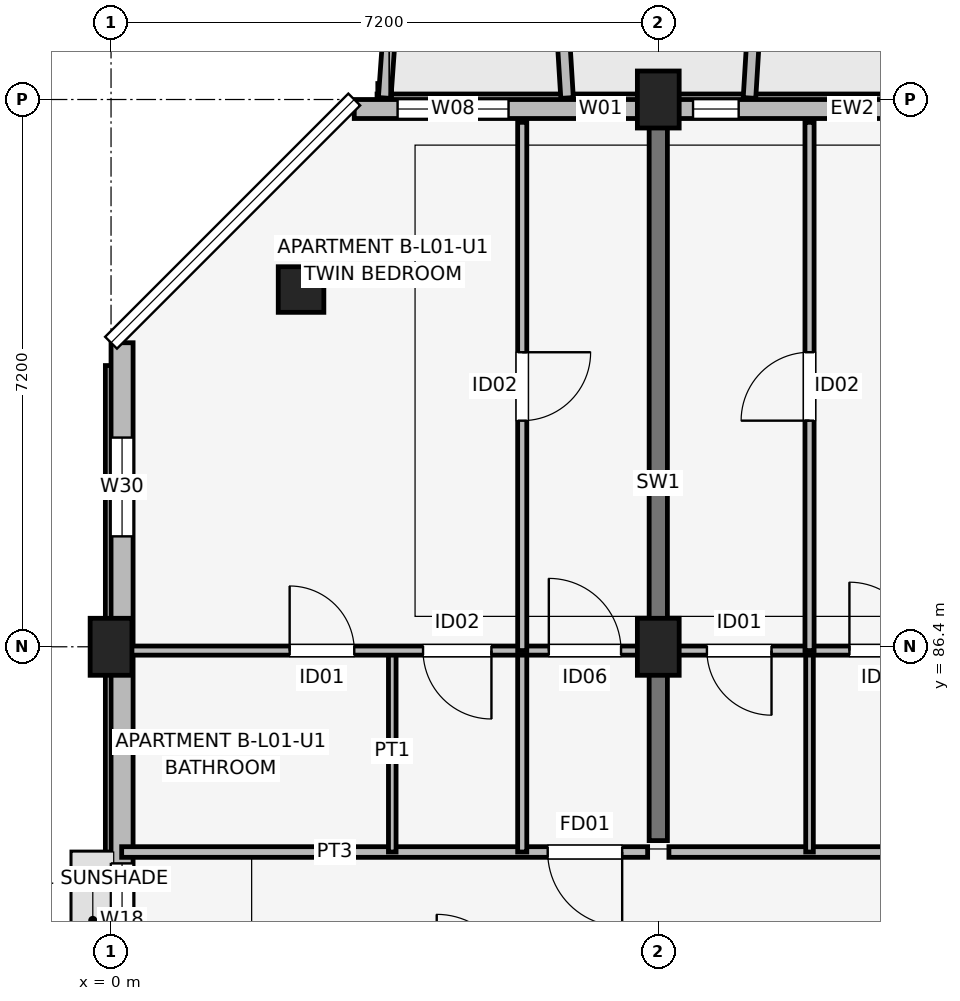
"""IFC4 building model, lengths in metres.
Left out: names, types, materials, properties, quantities, classifications, styles, units other than length and angle.
Written with IfcOpenShell. Run it as: python <this file> out.ifc"""

import sys

from ifc_helpers import new_model, si_unit, direction, frame, frame_2d, origin, origin_2d, place, context, subcontext, project, spatial, rectangle, extrude, element, fill, save


model = new_model("IFC4")
c1 = context("Model", 3, precision=1e-05, world=origin(), true_north=direction((0.0, 1.0)))
c2 = subcontext(c1, "Body", "Model", "MODEL_VIEW")
j1 = project(units=[si_unit("LENGTHUNIT", "METRE"), si_unit("PLANEANGLEUNIT", "RADIAN")], contexts=[c1])
p1 = place(None, origin())
s1 = spatial("IfcSite", under=j1, at=p1, CompositionType="ELEMENT")
p2 = place(p1, origin())
s2 = spatial("IfcBuilding", under=s1, at=p2, CompositionType="ELEMENT")
p3 = place(p2, frame((0.0, 0.0, 4.5)))
s3 = spatial("IfcBuildingStorey", under=s2, at=p3, CompositionType="ELEMENT", Elevation=4.5)
p4 = place(p3, frame((0.0, 86.4, 0.0), z_axis=(0.0, 0.0, 1.0), x_axis=(1.0, 0.0, 0.0)))
e1 = element("IfcColumn", 1, at=p4, inside=s3, PredefinedType="COLUMN", context=c2, shape_type="SweptSolid", body=[
    extrude(rectangle(XDim=0.55, YDim=0.75, at=origin_2d()), origin(), (0.0, 0.0, 1.0), 4.2),
])
p5 = place(p3, frame((2.5, 91.1, 0.0), z_axis=(0.0, 0.0, 1.0), x_axis=(1.0, 0.0, 0.0)))
e2 = element("IfcColumn", 2, at=p5, inside=s3, PredefinedType="COLUMN", context=c2, shape_type="SweptSolid", body=[
    extrude(rectangle(XDim=0.6, YDim=0.6, at=origin_2d()), origin(), (0.0, 0.0, 1.0), 4.2),
])
for number, where, z_axis, x_axis in (
    (3, (7.2, 86.4, 0.0), (0.0, 0.0, 1.0), (1.0, 0.0, 0.0)),
    (4, (7.2, 93.6, 0.0), (0.0, 0.0, 1.0), (1.0, 0.0, 0.0)),
):
    element("IfcColumn", number, at=place(p3, frame(where, z_axis=z_axis, x_axis=x_axis)), inside=s3, PredefinedType="COLUMN", context=c2, shape_type="SweptSolid", body=[
        extrude(rectangle(XDim=0.55, YDim=0.75, at=origin_2d()), origin(), (0.0, 0.0, 1.0), 4.2),
    ])
p6 = place(p3, frame((7.2, 83.85, 0.0), z_axis=(0.0, 0.0, 1.0), x_axis=(0.0, 1.0, 0.0)))
e5 = element("IfcWall", 5, at=p6, inside=s3, PredefinedType="SHEAR", context=c2, shape_type="SweptSolid", body=[
    extrude(rectangle(XDim=9.4, YDim=0.24, at=frame_2d((4.7, 0.0))), origin(), (0.0, 0.0, 1.0), 4.2),
])
p7 = place(p3, frame((32.8, 93.475, 0.0), z_axis=(0.0, 0.0, 1.0), x_axis=(-1.0, 0.0, 0.0)))
e6 = element("IfcWall", 6, at=p7, inside=s3, PredefinedType="SOLIDWALL", context=c2, shape_type="SweptSolid", body=[
    extrude(rectangle(XDim=29.6, YDim=0.25, at=frame_2d((14.8, 0.0))), origin(), (0.0, 0.0, 1.0), 3.48),
])
p8 = place(p7, frame((21.55, 0.0, 0.0), z_axis=(0.0, 0.0, 1.0), x_axis=(-1.0, 0.0, 0.0)))
e7 = element("IfcOpeningElement", 7, at=p8, cuts=e6, PredefinedType="OPENING", context=c2, shape_type="SweptSolid", body=[
    extrude(rectangle(XDim=1.5, YDim=2.15, at=frame_2d((0.75, 1.075))), frame((0.0, 0.135, 0.0), z_axis=(0.0, -1.0, 0.0), x_axis=(1.0, 0.0, 0.0)), (0.0, 0.0, 1.0), 0.27),
])
p9 = place(p7, frame((7.3, 0.0, 0.0), z_axis=(0.0, 0.0, 1.0), x_axis=(-1.0, 0.0, 0.0)))
e8 = element("IfcOpeningElement", 8, at=p9, cuts=e6, PredefinedType="OPENING", context=c2, shape_type="SweptSolid", body=[
    extrude(rectangle(XDim=1.8, YDim=2.15, at=frame_2d((0.9, 1.075))), frame((0.0, 0.135, 0.0), z_axis=(0.0, -1.0, 0.0), x_axis=(1.0, 0.0, 0.0)), (0.0, 0.0, 1.0), 0.27),
])
p10 = place(p7, frame((27.57, 0.0, 0.7)))
e9 = element("IfcOpeningElement", 9, at=p10, cuts=e6, PredefinedType="OPENING", context=c2, shape_type="SweptSolid", body=[
    extrude(rectangle(XDim=1.46, YDim=1.55, at=frame_2d((0.73, 0.775))), frame((0.0, 0.135, 0.0), z_axis=(0.0, -1.0, 0.0), x_axis=(1.0, 0.0, 0.0)), (0.0, 0.0, 1.0), 0.27),
])
p11 = place(p7, frame((26.058, 0.0, 0.75)))
e10 = element("IfcOpeningElement", 10, at=p11, cuts=e6, PredefinedType="OPENING", context=c2, shape_type="SweptSolid", body=[
    extrude(rectangle(XDim=0.6, YDim=1.25, at=frame_2d((0.3, 0.625))), frame((0.0, 0.135, 0.0), z_axis=(0.0, -1.0, 0.0), x_axis=(1.0, 0.0, 0.0)), (0.0, 0.0, 1.0), 0.27),
])
p12 = place(p7, frame((24.542, 0.0, 0.75)))
e11 = element("IfcOpeningElement", 11, at=p12, cuts=e6, PredefinedType="OPENING", context=c2, shape_type="SweptSolid", body=[
    extrude(rectangle(XDim=0.6, YDim=1.25, at=frame_2d((0.3, 0.625))), frame((0.0, 0.135, 0.0), z_axis=(0.0, -1.0, 0.0), x_axis=(1.0, 0.0, 0.0)), (0.0, 0.0, 1.0), 0.27),
])
p13 = place(p7, frame((14.925, 0.0, 0.7)))
e12 = element("IfcOpeningElement", 12, at=p13, cuts=e6, PredefinedType="OPENING", context=c2, shape_type="SweptSolid", body=[
    extrude(rectangle(XDim=2.15, YDim=1.65, at=frame_2d((1.075, 0.825))), frame((0.0, 0.135, 0.0), z_axis=(0.0, -1.0, 0.0), x_axis=(1.0, 0.0, 0.0)), (0.0, 0.0, 1.0), 0.27),
])
p14 = place(p7, frame((12.545, 0.0, 0.75)))
e13 = element("IfcOpeningElement", 13, at=p14, cuts=e6, PredefinedType="OPENING", context=c2, shape_type="SweptSolid", body=[
    extrude(rectangle(XDim=1.46, YDim=1.55, at=frame_2d((0.73, 0.775))), frame((0.0, 0.135, 0.0), z_axis=(0.0, -1.0, 0.0), x_axis=(1.0, 0.0, 0.0)), (0.0, 0.0, 1.0), 0.27),
])
p15 = place(p7, frame((9.185, 0.0, 0.75)))
e14 = element("IfcOpeningElement", 14, at=p15, cuts=e6, PredefinedType="OPENING", context=c2, shape_type="SweptSolid", body=[
    extrude(rectangle(XDim=0.6, YDim=1.25, at=frame_2d((0.3, 0.625))), frame((0.0, 0.135, 0.0), z_axis=(0.0, -1.0, 0.0), x_axis=(1.0, 0.0, 0.0)), (0.0, 0.0, 1.0), 0.27),
])
p16 = place(p7, frame((2.942, 0.0, 0.75)))
e15 = element("IfcOpeningElement", 15, at=p16, cuts=e6, PredefinedType="OPENING", context=c2, shape_type="SweptSolid", body=[
    extrude(rectangle(XDim=0.6, YDim=1.25, at=frame_2d((0.3, 0.625))), frame((0.0, 0.135, 0.0), z_axis=(0.0, -1.0, 0.0), x_axis=(1.0, 0.0, 0.0)), (0.0, 0.0, 1.0), 0.27),
])
p17 = place(p7, frame((0.745, 0.0, 0.75)))
e16 = element("IfcOpeningElement", 16, at=p17, cuts=e6, PredefinedType="OPENING", context=c2, shape_type="SweptSolid", body=[
    extrude(rectangle(XDim=0.85, YDim=1.4, at=frame_2d((0.425, 0.7))), frame((0.0, 0.135, 0.0), z_axis=(0.0, -1.0, 0.0), x_axis=(1.0, 0.0, 0.0)), (0.0, 0.0, 1.0), 0.27),
])
p18 = place(p3, frame((0.145, 90.4, 0.0), z_axis=(0.0, 0.0, 1.0), x_axis=(0.0, -1.0, 0.0)))
e17 = element("IfcWall", 17, at=p18, inside=s3, PredefinedType="SOLIDWALL", context=c2, shape_type="SweptSolid", body=[
    extrude(rectangle(XDim=15.2, YDim=0.29, at=frame_2d((7.6, 0.0))), origin(), (0.0, 0.0, 1.0), 3.43),
])
p19 = place(p18, frame((6.85, 0.0, 1.05)))
e18 = element("IfcOpeningElement", 18, at=p19, cuts=e17, PredefinedType="OPENING", context=c2, shape_type="SweptSolid", body=[
    extrude(rectangle(XDim=1.5, YDim=1.15, at=frame_2d((0.75, 0.575))), frame((0.0, 0.155, 0.0), z_axis=(0.0, -1.0, 0.0), x_axis=(1.0, 0.0, 0.0)), (0.0, 0.0, 1.0), 0.31),
])
p20 = place(p18, frame((1.248, 0.0, 0.75)))
e19 = element("IfcOpeningElement", 19, at=p20, cuts=e17, PredefinedType="OPENING", context=c2, shape_type="SweptSolid", body=[
    extrude(rectangle(XDim=1.3, YDim=1.55, at=frame_2d((0.65, 0.775))), frame((0.0, 0.155, 0.0), z_axis=(0.0, -1.0, 0.0), x_axis=(1.0, 0.0, 0.0)), (0.0, 0.0, 1.0), 0.31),
])
p21 = place(p3, frame((3.6, 93.62, 0.0), z_axis=(0.0, 0.0, 1.0), x_axis=(0.071194071069, 0.997462482625, 0.0)))
e20 = element("IfcWall", 20, at=p21, inside=s3, PredefinedType="ELEMENTEDWALL", context=c2, shape_type="SweptSolid", body=[
    extrude(rectangle(XDim=1.965, YDim=0.165, at=frame_2d((0.982, 0.0))), origin(), (0.0, 0.0, 1.0), 4.0),
])
p22 = place(p3, frame((6.0, 93.62, 0.0), z_axis=(0.0, 0.0, 1.0), x_axis=(-0.061170732449, 0.998127317276, 0.0)))
e21 = element("IfcWall", 21, at=p22, inside=s3, PredefinedType="ELEMENTEDWALL", context=c2, shape_type="SweptSolid", body=[
    extrude(rectangle(XDim=1.964, YDim=0.165, at=frame_2d((0.982, 0.0))), origin(), (0.0, 0.0, 1.0), 4.0),
])
p23 = place(p3, frame((8.4, 93.62, 0.0), z_axis=(0.0, 0.0, 1.0), x_axis=(0.061170732449, 0.998127317276, 0.0)))
e22 = element("IfcWall", 22, at=p23, inside=s3, PredefinedType="ELEMENTEDWALL", context=c2, shape_type="SweptSolid", body=[
    extrude(rectangle(XDim=1.964, YDim=0.165, at=frame_2d((0.982, 0.0))), origin(), (0.0, 0.0, 1.0), 3.58),
])
p24 = place(p3, frame((0.14, 83.7, 0.0), z_axis=(0.0, 0.0, 1.0), x_axis=(1.0, 0.0, 0.0)))
e23 = element("IfcWall", 23, at=p24, inside=s3, PredefinedType="PARTITIONING", context=c2, shape_type="SweptSolid", body=[
    extrude(rectangle(XDim=6.92, YDim=0.14, at=frame_2d((3.46, 0.0))), origin(), (0.0, 0.0, 1.0), 3.25),
])
p25 = place(p24, frame((6.585, 0.0, 0.0), z_axis=(0.0, 0.0, 1.0), x_axis=(-1.0, 0.0, 0.0)))
e24 = element("IfcOpeningElement", 24, at=p25, cuts=e23, PredefinedType="OPENING", context=c2, shape_type="SweptSolid", body=[
    extrude(rectangle(XDim=0.98, YDim=2.1, at=frame_2d((0.49, 1.05))), frame((0.0, 0.08, 0.0), z_axis=(0.0, -1.0, 0.0), x_axis=(1.0, 0.0, 0.0)), (0.0, 0.0, 1.0), 0.16),
])
p26 = place(p3, frame((3.7, 83.7, 0.0), z_axis=(0.0, 0.0, 1.0), x_axis=(0.0, 1.0, 0.0)))
e25 = element("IfcWall", 25, at=p26, inside=s3, PredefinedType="PARTITIONING", context=c2, shape_type="SweptSolid", body=[
    extrude(rectangle(XDim=2.65, YDim=0.1, at=frame_2d((1.325, 0.0))), origin(), (0.0, 0.0, 1.0), 3.25),
])
p27 = place(p3, frame((5.41, 83.7, 0.0), z_axis=(0.0, 0.0, 1.0), x_axis=(0.0, 1.0, 0.0)))
e26 = element("IfcWall", 26, at=p27, inside=s3, PredefinedType="PARTITIONING", context=c2, shape_type="SweptSolid", body=[
    extrude(rectangle(XDim=2.65, YDim=0.12, at=frame_2d((1.325, 0.0))), origin(), (0.0, 0.0, 1.0), 3.25),
])
p28 = place(p3, frame((0.14, 86.35, 0.0), z_axis=(0.0, 0.0, 1.0), x_axis=(1.0, 0.0, 0.0)))
e27 = element("IfcWall", 27, at=p28, inside=s3, PredefinedType="PARTITIONING", context=c2, shape_type="SweptSolid", body=[
    extrude(rectangle(XDim=6.92, YDim=0.12, at=frame_2d((3.46, 0.0))), origin(), (0.0, 0.0, 1.0), 3.25),
])
p29 = place(p28, frame((2.21, 0.0, 0.0)))
e28 = element("IfcOpeningElement", 28, at=p29, cuts=e27, PredefinedType="OPENING", context=c2, shape_type="SweptSolid", body=[
    extrude(rectangle(XDim=0.85, YDim=2.08, at=frame_2d((0.425, 1.04))), frame((0.0, 0.07, 0.0), z_axis=(0.0, -1.0, 0.0), x_axis=(1.0, 0.0, 0.0)), (0.0, 0.0, 1.0), 0.14),
])
p30 = place(p28, frame((4.865, 0.0, 0.0), z_axis=(0.0, 0.0, 1.0), x_axis=(-1.0, 0.0, 0.0)))
e29 = element("IfcOpeningElement", 29, at=p30, cuts=e27, PredefinedType="OPENING", context=c2, shape_type="SweptSolid", body=[
    extrude(rectangle(XDim=0.9, YDim=2.08, at=frame_2d((0.45, 1.04))), frame((0.0, 0.07, 0.0), z_axis=(0.0, -1.0, 0.0), x_axis=(1.0, 0.0, 0.0)), (0.0, 0.0, 1.0), 0.14),
])
p31 = place(p28, frame((5.62, 0.0, 0.0)))
e30 = element("IfcOpeningElement", 30, at=p31, cuts=e27, PredefinedType="OPENING", context=c2, shape_type="SweptSolid", body=[
    extrude(rectangle(XDim=0.95, YDim=2.08, at=frame_2d((0.475, 1.04))), frame((0.0, 0.07, 0.0), z_axis=(0.0, -1.0, 0.0), x_axis=(1.0, 0.0, 0.0)), (0.0, 0.0, 1.0), 0.14),
])
p32 = place(p3, frame((5.41, 86.35, 0.0), z_axis=(0.0, 0.0, 1.0), x_axis=(0.0, 1.0, 0.0)))
e31 = element("IfcWall", 31, at=p32, inside=s3, PredefinedType="PARTITIONING", context=c2, shape_type="SweptSolid", body=[
    extrude(rectangle(XDim=6.95, YDim=0.12, at=frame_2d((3.475, 0.0))), origin(), (0.0, 0.0, 1.0), 3.25),
])
p33 = place(p32, frame((3.925, 0.0, 0.0), z_axis=(0.0, 0.0, 1.0), x_axis=(-1.0, 0.0, 0.0)))
e32 = element("IfcOpeningElement", 32, at=p33, cuts=e31, PredefinedType="OPENING", context=c2, shape_type="SweptSolid", body=[
    extrude(rectangle(XDim=0.9, YDim=2.08, at=frame_2d((0.45, 1.04))), frame((0.0, 0.07, 0.0), z_axis=(0.0, -1.0, 0.0), x_axis=(1.0, 0.0, 0.0)), (0.0, 0.0, 1.0), 0.14),
])
p34 = place(p3, frame((7.34, 83.7, 0.0), z_axis=(0.0, 0.0, 1.0), x_axis=(1.0, 0.0, 0.0)))
e33 = element("IfcWall", 33, at=p34, inside=s3, PredefinedType="PARTITIONING", context=c2, shape_type="SweptSolid", body=[
    extrude(rectangle(XDim=6.92, YDim=0.14, at=frame_2d((3.46, 0.0))), origin(), (0.0, 0.0, 1.0), 3.25),
])
p35 = place(p34, frame((4.87, 0.0, 0.0)))
e34 = element("IfcOpeningElement", 34, at=p35, cuts=e33, PredefinedType="OPENING", context=c2, shape_type="SweptSolid", body=[
    extrude(rectangle(XDim=0.98, YDim=2.1, at=frame_2d((0.49, 1.05))), frame((0.0, 0.08, 0.0), z_axis=(0.0, -1.0, 0.0), x_axis=(1.0, 0.0, 0.0)), (0.0, 0.0, 1.0), 0.16),
])
p36 = place(p3, frame((9.19, 83.7, 0.0), z_axis=(0.0, 0.0, 1.0), x_axis=(0.0, 1.0, 0.0)))
e35 = element("IfcWall", 35, at=p36, inside=s3, PredefinedType="PARTITIONING", context=c2, shape_type="SweptSolid", body=[
    extrude(rectangle(XDim=2.65, YDim=0.1, at=frame_2d((1.325, 0.0))), origin(), (0.0, 0.0, 1.0), 3.25),
])
p37 = place(p3, frame((7.34, 86.35, 0.0), z_axis=(0.0, 0.0, 1.0), x_axis=(1.0, 0.0, 0.0)))
e36 = element("IfcWall", 36, at=p37, inside=s3, PredefinedType="PARTITIONING", context=c2, shape_type="SweptSolid", body=[
    extrude(rectangle(XDim=6.92, YDim=0.12, at=frame_2d((3.46, 0.0))), origin(), (0.0, 0.0, 1.0), 3.25),
])
p38 = place(p37, frame((1.35, 0.0, 0.0), z_axis=(0.0, 0.0, 1.0), x_axis=(-1.0, 0.0, 0.0)))
e37 = element("IfcOpeningElement", 37, at=p38, cuts=e36, PredefinedType="OPENING", context=c2, shape_type="SweptSolid", body=[
    extrude(rectangle(XDim=0.85, YDim=2.08, at=frame_2d((0.425, 1.04))), frame((0.0, 0.07, 0.0), z_axis=(0.0, -1.0, 0.0), x_axis=(1.0, 0.0, 0.0)), (0.0, 0.0, 1.0), 0.14),
])
p39 = place(p37, frame((2.375, 0.0, 0.0)))
e38 = element("IfcOpeningElement", 38, at=p39, cuts=e36, PredefinedType="OPENING", context=c2, shape_type="SweptSolid", body=[
    extrude(rectangle(XDim=0.9, YDim=2.08, at=frame_2d((0.45, 1.04))), frame((0.0, 0.07, 0.0), z_axis=(0.0, -1.0, 0.0), x_axis=(1.0, 0.0, 0.0)), (0.0, 0.0, 1.0), 0.14),
])
p40 = place(p37, frame((5.835, 0.0, 0.0), z_axis=(0.0, 0.0, 1.0), x_axis=(-1.0, 0.0, 0.0)))
e39 = element("IfcOpeningElement", 39, at=p40, cuts=e36, PredefinedType="OPENING", context=c2, shape_type="SweptSolid", body=[
    extrude(rectangle(XDim=0.95, YDim=2.08, at=frame_2d((0.475, 1.04))), frame((0.0, 0.07, 0.0), z_axis=(0.0, -1.0, 0.0), x_axis=(1.0, 0.0, 0.0)), (0.0, 0.0, 1.0), 0.14),
])
p41 = place(p3, frame((9.19, 86.35, 0.0), z_axis=(0.0, 0.0, 1.0), x_axis=(0.0, 1.0, 0.0)))
e40 = element("IfcWall", 40, at=p41, inside=s3, PredefinedType="PARTITIONING", context=c2, shape_type="SweptSolid", body=[
    extrude(rectangle(XDim=6.95, YDim=0.12, at=frame_2d((3.475, 0.0))), origin(), (0.0, 0.0, 1.0), 3.25),
])
p42 = place(p41, frame((3.025, 0.0, 0.0)))
e41 = element("IfcOpeningElement", 41, at=p42, cuts=e40, PredefinedType="OPENING", context=c2, shape_type="SweptSolid", body=[
    extrude(rectangle(XDim=0.9, YDim=2.08, at=frame_2d((0.45, 1.04))), frame((0.0, 0.07, 0.0), z_axis=(0.0, -1.0, 0.0), x_axis=(1.0, 0.0, 0.0)), (0.0, 0.0, 1.0), 0.14),
])
p43 = place(p10, origin())
e42 = element("IfcWindow", 42, at=p43, inside=s3, PartitioningType="SINGLE_PANEL", PredefinedType="WINDOW", context=c2, shape_type="SweptSolid", body=[
    extrude(rectangle(XDim=1.46, YDim=1.55, at=frame_2d((0.73, 0.775))), frame((0.0, 0.03, 0.0), z_axis=(0.0, -1.0, 0.0), x_axis=(1.0, 0.0, 0.0)), (0.0, 0.0, 1.0), 0.06),
])
fill(e9, e42)
p44 = place(p11, origin())
e43 = element("IfcWindow", 43, at=p44, inside=s3, PartitioningType="SINGLE_PANEL", PredefinedType="WINDOW", context=c2, shape_type="SweptSolid", body=[
    extrude(rectangle(XDim=0.6, YDim=1.25, at=frame_2d((0.3, 0.625))), frame((0.0, 0.03, 0.0), z_axis=(0.0, -1.0, 0.0), x_axis=(1.0, 0.0, 0.0)), (0.0, 0.0, 1.0), 0.06),
])
fill(e10, e43)
p45 = place(p12, origin())
e44 = element("IfcWindow", 44, at=p45, inside=s3, PartitioningType="SINGLE_PANEL", PredefinedType="WINDOW", context=c2, shape_type="SweptSolid", body=[
    extrude(rectangle(XDim=0.6, YDim=1.25, at=frame_2d((0.3, 0.625))), frame((0.0, 0.03, 0.0), z_axis=(0.0, -1.0, 0.0), x_axis=(1.0, 0.0, 0.0)), (0.0, 0.0, 1.0), 0.06),
])
fill(e11, e44)
p46 = place(p19, origin())
e45 = element("IfcWindow", 45, at=p46, inside=s3, PartitioningType="SINGLE_PANEL", PredefinedType="WINDOW", context=c2, shape_type="SweptSolid", body=[
    extrude(rectangle(XDim=1.5, YDim=1.15, at=frame_2d((0.75, 0.575))), frame((0.0, 0.03, 0.0), z_axis=(0.0, -1.0, 0.0), x_axis=(1.0, 0.0, 0.0)), (0.0, 0.0, 1.0), 0.06),
])
fill(e18, e45)
p47 = place(p20, origin())
e46 = element("IfcWindow", 46, at=p47, inside=s3, PartitioningType="SINGLE_PANEL", PredefinedType="WINDOW", context=c2, shape_type="SweptSolid", body=[
    extrude(rectangle(XDim=1.3, YDim=1.55, at=frame_2d((0.65, 0.775))), frame((0.0, 0.03, 0.0), z_axis=(0.0, -1.0, 0.0), x_axis=(1.0, 0.0, 0.0)), (0.0, 0.0, 1.0), 0.06),
])
fill(e19, e46)
p48 = place(p25, origin())
e47 = element("IfcDoor", 47, at=p48, inside=s3, OperationType="SINGLE_SWING_RIGHT", PredefinedType="DOOR", context=c2, shape_type="SweptSolid", body=[
    extrude(rectangle(XDim=0.98, YDim=2.1, at=frame_2d((0.49, 1.05))), frame((0.0, 0.025, 0.0), z_axis=(0.0, -1.0, 0.0), x_axis=(1.0, 0.0, 0.0)), (0.0, 0.0, 1.0), 0.05),
])
fill(e24, e47)
p49 = place(p29, origin())
e48 = element("IfcDoor", 48, at=p49, inside=s3, OperationType="SINGLE_SWING_LEFT", PredefinedType="DOOR", context=c2, shape_type="SweptSolid", body=[
    extrude(rectangle(XDim=0.85, YDim=2.08, at=frame_2d((0.425, 1.04))), frame((0.0, 0.025, 0.0), z_axis=(0.0, -1.0, 0.0), x_axis=(1.0, 0.0, 0.0)), (0.0, 0.0, 1.0), 0.05),
])
fill(e28, e48)
p50 = place(p30, origin())
e49 = element("IfcDoor", 49, at=p50, inside=s3, OperationType="SINGLE_SWING_RIGHT", PredefinedType="DOOR", context=c2, shape_type="SweptSolid", body=[
    extrude(rectangle(XDim=0.9, YDim=2.08, at=frame_2d((0.45, 1.04))), frame((0.0, 0.025, 0.0), z_axis=(0.0, -1.0, 0.0), x_axis=(1.0, 0.0, 0.0)), (0.0, 0.0, 1.0), 0.05),
])
fill(e29, e49)
p51 = place(p31, origin())
e50 = element("IfcDoor", 50, at=p51, inside=s3, OperationType="SINGLE_SWING_LEFT", PredefinedType="DOOR", context=c2, shape_type="SweptSolid", body=[
    extrude(rectangle(XDim=0.95, YDim=2.08, at=frame_2d((0.475, 1.04))), frame((0.0, 0.025, 0.0), z_axis=(0.0, -1.0, 0.0), x_axis=(1.0, 0.0, 0.0)), (0.0, 0.0, 1.0), 0.05),
])
fill(e30, e50)
p52 = place(p33, origin())
e51 = element("IfcDoor", 51, at=p52, inside=s3, OperationType="SINGLE_SWING_RIGHT", PredefinedType="DOOR", context=c2, shape_type="SweptSolid", body=[
    extrude(rectangle(XDim=0.9, YDim=2.08, at=frame_2d((0.45, 1.04))), frame((0.0, 0.025, 0.0), z_axis=(0.0, -1.0, 0.0), x_axis=(1.0, 0.0, 0.0)), (0.0, 0.0, 1.0), 0.05),
])
fill(e32, e51)
p53 = place(p38, origin())
e52 = element("IfcDoor", 52, at=p53, inside=s3, OperationType="SINGLE_SWING_RIGHT", PredefinedType="DOOR", context=c2, shape_type="SweptSolid", body=[
    extrude(rectangle(XDim=0.85, YDim=2.08, at=frame_2d((0.425, 1.04))), frame((0.0, 0.025, 0.0), z_axis=(0.0, -1.0, 0.0), x_axis=(1.0, 0.0, 0.0)), (0.0, 0.0, 1.0), 0.05),
])
fill(e37, e52)
p54 = place(p39, origin())
e53 = element("IfcDoor", 53, at=p54, inside=s3, OperationType="SINGLE_SWING_LEFT", PredefinedType="DOOR", context=c2, shape_type="SweptSolid", body=[
    extrude(rectangle(XDim=0.9, YDim=2.08, at=frame_2d((0.45, 1.04))), frame((0.0, 0.025, 0.0), z_axis=(0.0, -1.0, 0.0), x_axis=(1.0, 0.0, 0.0)), (0.0, 0.0, 1.0), 0.05),
])
fill(e38, e53)
p55 = place(p42, origin())
e54 = element("IfcDoor", 54, at=p55, inside=s3, OperationType="SINGLE_SWING_LEFT", PredefinedType="DOOR", context=c2, shape_type="SweptSolid", body=[
    extrude(rectangle(XDim=0.9, YDim=2.08, at=frame_2d((0.45, 1.04))), frame((0.0, 0.025, 0.0), z_axis=(0.0, -1.0, 0.0), x_axis=(1.0, 0.0, 0.0)), (0.0, 0.0, 1.0), 0.05),
])
fill(e41, e54)
save(model, sys.argv[1])
